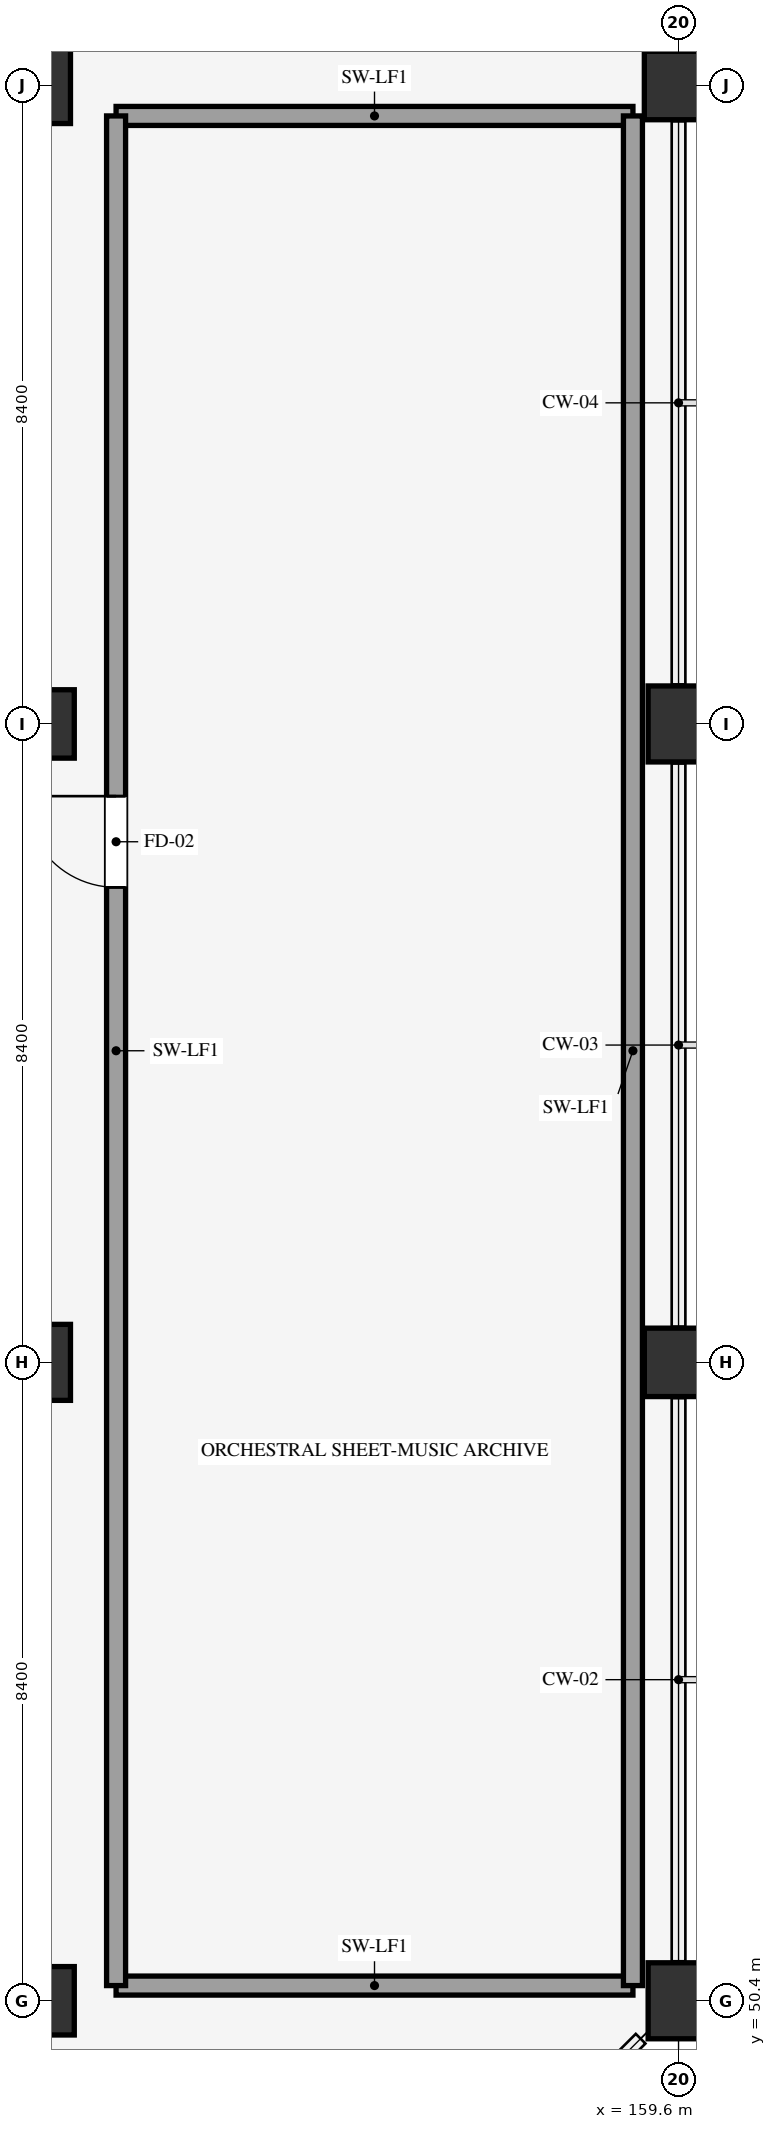
"""IFC4 building model, lengths in metres.
Left out: names, types, materials, properties, quantities, classifications, styles, units other than length and angle.
Written with IfcOpenShell. Run it as: python <this file> out.ifc"""

import sys

from ifc_helpers import new_model, si_unit, direction, frame, frame_2d, origin, origin_2d, place, context, subcontext, project, spatial, rectangle, extrude, element, fill, save


model = new_model("IFC4")
c1 = context("Model", 3, precision=1e-05, world=origin(), true_north=direction((0.0, 1.0)))
c2 = subcontext(c1, "Body", "Model", "MODEL_VIEW")
j1 = project(units=[si_unit("LENGTHUNIT", "METRE"), si_unit("PLANEANGLEUNIT", "RADIAN")], contexts=[c1])
p1 = place(None, origin())
s1 = spatial("IfcSite", under=j1, at=p1, CompositionType="ELEMENT")
p2 = place(p1, origin())
s2 = spatial("IfcBuilding", under=s1, at=p2, CompositionType="ELEMENT")
p3 = place(p2, frame((0.0, 0.0, 65.7)))
s3 = spatial("IfcBuildingStorey", under=s2, at=p3, CompositionType="ELEMENT", Elevation=65.7)
p4 = place(p3, frame((151.2, 50.4, 0.0), z_axis=(0.0, 0.0, 1.0), x_axis=(1.0, 0.0, 0.0)))
e1 = element("IfcColumn", 1, at=p4, inside=s3, PredefinedType="COLUMN", context=c2, shape_type="SweptSolid", body=[
    extrude(rectangle(XDim=0.9, YDim=0.9, at=origin_2d()), origin(), (0.0, 0.0, 1.0), 4.2),
])
p5 = place(p3, frame((151.2, 58.8, 0.0), z_axis=(0.0, 0.0, 1.0), x_axis=(1.0, 0.0, 0.0)))
e2 = element("IfcColumn", 2, at=p5, inside=s3, PredefinedType="COLUMN", context=c2, shape_type="SweptSolid", body=[
    extrude(rectangle(XDim=0.8, YDim=1.0, at=origin_2d()), origin(), (0.0, 0.0, 1.0), 4.2),
])
p6 = place(p3, frame((151.2, 67.2, 0.0), z_axis=(0.0, 0.0, 1.0), x_axis=(1.0, 0.0, 0.0)))
e3 = element("IfcColumn", 3, at=p6, inside=s3, PredefinedType="COLUMN", context=c2, shape_type="SweptSolid", body=[
    extrude(rectangle(XDim=0.9, YDim=0.9, at=origin_2d()), origin(), (0.0, 0.0, 1.0), 4.2),
])
for number, where, z_axis, x_axis in (
    (4, (151.2, 75.6, 0.0), (0.0, 0.0, 1.0), (1.0, 0.0, 0.0)),
    (5, (159.6, 50.4, 0.0), (0.0, 0.0, 1.0), (1.0, 0.0, 0.0)),
):
    element("IfcColumn", number, at=place(p3, frame(where, z_axis=z_axis, x_axis=x_axis)), inside=s3, PredefinedType="COLUMN", context=c2, shape_type="SweptSolid", body=[
        extrude(rectangle(XDim=0.8, YDim=1.0, at=origin_2d()), origin(), (0.0, 0.0, 1.0), 4.2),
    ])
p7 = place(p3, frame((159.6, 58.8, 0.0), z_axis=(0.0, 0.0, 1.0), x_axis=(1.0, 0.0, 0.0)))
e6 = element("IfcColumn", 6, at=p7, inside=s3, PredefinedType="COLUMN", context=c2, shape_type="SweptSolid", body=[
    extrude(rectangle(XDim=0.9, YDim=0.9, at=origin_2d()), origin(), (0.0, 0.0, 1.0), 4.2),
])
p8 = place(p3, frame((159.6, 67.2, 0.0), z_axis=(0.0, 0.0, 1.0), x_axis=(1.0, 0.0, 0.0)))
e7 = element("IfcColumn", 7, at=p8, inside=s3, PredefinedType="COLUMN", context=c2, shape_type="SweptSolid", body=[
    extrude(rectangle(XDim=0.8, YDim=1.0, at=origin_2d()), origin(), (0.0, 0.0, 1.0), 4.2),
])
p9 = place(p3, frame((159.6, 75.6, 0.0), z_axis=(0.0, 0.0, 1.0), x_axis=(1.0, 0.0, 0.0)))
e8 = element("IfcColumn", 8, at=p9, inside=s3, PredefinedType="COLUMN", context=c2, shape_type="SweptSolid", body=[
    extrude(rectangle(XDim=0.9, YDim=0.9, at=origin_2d()), origin(), (0.0, 0.0, 1.0), 4.2),
])
for number, where, z_axis, x_axis in (
    (9, (152.2, 50.6, 0.0), (0.0, 0.0, 1.0), (1.0, 0.0, 0.0)),
    (10, (152.2, 75.2, 0.0), (0.0, 0.0, 1.0), (1.0, 0.0, 0.0)),
):
    element("IfcWall", number, at=place(p3, frame(where, z_axis=z_axis, x_axis=x_axis)), inside=s3, PredefinedType="SHEAR", context=c2, shape_type="SweptSolid", body=[
        extrude(rectangle(XDim=6.8, YDim=0.25, at=frame_2d((3.4, 0.0))), origin(), (0.0, 0.0, 1.0), 3.96),
    ])
p10 = place(p3, frame((152.2, 50.6, 0.0), z_axis=(0.0, 0.0, 1.0), x_axis=(0.0, 1.0, 0.0)))
e11 = element("IfcWall", 11, at=p10, inside=s3, PredefinedType="SHEAR", context=c2, shape_type="SweptSolid", body=[
    extrude(rectangle(XDim=24.6, YDim=0.25, at=frame_2d((12.3, 0.0))), origin(), (0.0, 0.0, 1.0), 3.96),
])
p11 = place(p10, frame((14.45, 0.0, 0.0)))
e12 = element("IfcOpeningElement", 12, at=p11, cuts=e11, PredefinedType="OPENING", context=c2, shape_type="SweptSolid", body=[
    extrude(rectangle(XDim=1.2, YDim=2.15, at=frame_2d((0.6, 1.075))), frame((0.0, 0.135, 0.0), z_axis=(0.0, -1.0, 0.0), x_axis=(1.0, 0.0, 0.0)), (0.0, 0.0, 1.0), 0.27),
])
p12 = place(p3, frame((159.0, 50.6, 0.0), z_axis=(0.0, 0.0, 1.0), x_axis=(0.0, 1.0, 0.0)))
e13 = element("IfcWall", 13, at=p12, inside=s3, PredefinedType="SHEAR", context=c2, shape_type="SweptSolid", body=[
    extrude(rectangle(XDim=24.6, YDim=0.25, at=frame_2d((12.3, 0.0))), origin(), (0.0, 0.0, 1.0), 3.96),
])
p13 = place(p11, origin())
e14 = element("IfcDoor", 14, at=p13, inside=s3, OperationType="SINGLE_SWING_RIGHT", PredefinedType="DOOR", context=c2, shape_type="SweptSolid", body=[
    extrude(rectangle(XDim=1.2, YDim=2.15, at=frame_2d((0.6, 1.075))), frame((0.0, 0.025, 0.0), z_axis=(0.0, -1.0, 0.0), x_axis=(1.0, 0.0, 0.0)), (0.0, 0.0, 1.0), 0.05),
])
fill(e12, e14)
save(model, sys.argv[1])
